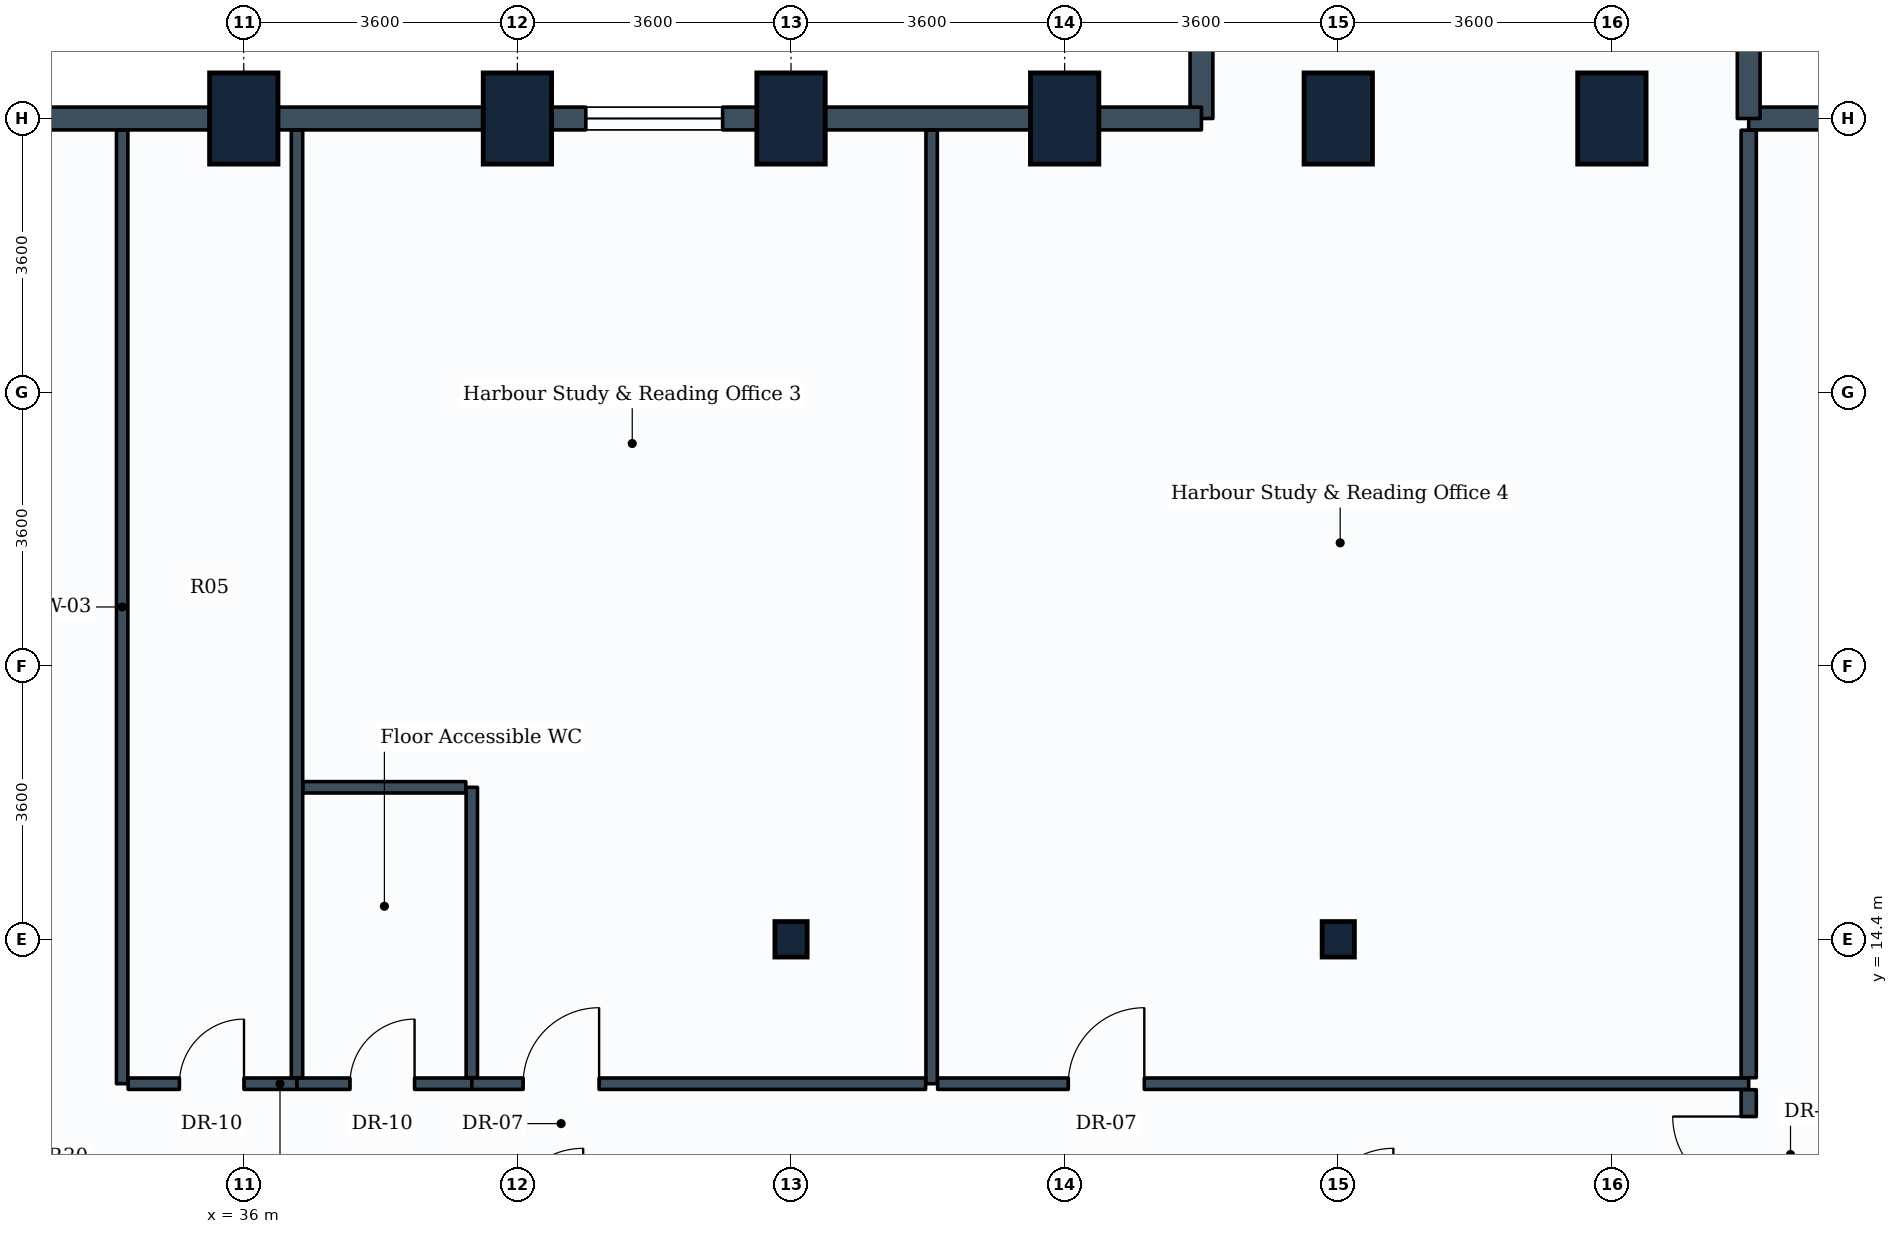
"""IFC4 building model, lengths in metres.
Left out: names, types, materials, properties, quantities, classifications, styles, units other than length and angle.
Written with IfcOpenShell. Run it as: python <this file> out.ifc"""

import sys

from ifc_helpers import new_model, si_unit, direction, frame, frame_2d, origin, origin_2d, place, context, subcontext, project, spatial, rectangle, i_section, extrude, element, fill, save


model = new_model("IFC4")
c1 = context("Model", 3, precision=1e-05, world=origin(), true_north=direction((0.0, 1.0)))
c2 = subcontext(c1, "Body", "Model", "MODEL_VIEW")
j1 = project(units=[si_unit("LENGTHUNIT", "METRE"), si_unit("PLANEANGLEUNIT", "RADIAN")], contexts=[c1])
p1 = place(None, origin())
s1 = spatial("IfcSite", under=j1, at=p1, CompositionType="ELEMENT")
p2 = place(p1, origin())
s2 = spatial("IfcBuilding", under=s1, at=p2, CompositionType="ELEMENT")
p3 = place(p2, frame((0.0, 0.0, 70.8)))
s3 = spatial("IfcBuildingStorey", under=s2, at=p3, CompositionType="ELEMENT", Elevation=70.8)
for number, where, z_axis, x_axis in (
    (1, (36.0, 25.2, 0.0), (0.0, 0.0, 1.0), (1.0, 0.0, 0.0)),
    (2, (39.6, 25.2, 0.0), (0.0, 0.0, 1.0), (1.0, 0.0, 0.0)),
):
    element("IfcColumn", number, at=place(p3, frame(where, z_axis=z_axis, x_axis=x_axis)), inside=s3, PredefinedType="COLUMN", context=c2, shape_type="SweptSolid", body=[
        extrude(rectangle(XDim=0.9, YDim=1.2, at=origin_2d()), origin(), (0.0, 0.0, 1.0), 3.9),
    ])
p4 = place(p3, frame((43.2, 14.4, 0.0), z_axis=(0.0, 0.0, 1.0), x_axis=(1.0, 0.0, 0.0)))
e3 = element("IfcColumn", 3, at=p4, inside=s3, PredefinedType="COLUMN", context=c2, shape_type="SweptSolid", body=[
    extrude(i_section(OverallWidth=0.424, OverallDepth=0.467, WebThickness=0.033, FlangeThickness=0.053, FilletRadius=0.015, at=origin_2d()), origin(), (0.0, 0.0, 1.0), 3.9),
])
for number, where, z_axis, x_axis in (
    (4, (43.2, 25.2, 0.0), (0.0, 0.0, 1.0), (1.0, 0.0, 0.0)),
    (5, (46.8, 25.2, 0.0), (0.0, 0.0, 1.0), (1.0, 0.0, 0.0)),
):
    element("IfcColumn", number, at=place(p3, frame(where, z_axis=z_axis, x_axis=x_axis)), inside=s3, PredefinedType="COLUMN", context=c2, shape_type="SweptSolid", body=[
        extrude(rectangle(XDim=0.9, YDim=1.2, at=origin_2d()), origin(), (0.0, 0.0, 1.0), 3.9),
    ])
p5 = place(p3, frame((50.4, 14.4, 0.0), z_axis=(0.0, 0.0, 1.0), x_axis=(1.0, 0.0, 0.0)))
e6 = element("IfcColumn", 6, at=p5, inside=s3, PredefinedType="COLUMN", context=c2, shape_type="SweptSolid", body=[
    extrude(i_section(OverallWidth=0.424, OverallDepth=0.467, WebThickness=0.033, FlangeThickness=0.053, FilletRadius=0.015, at=origin_2d()), origin(), (0.0, 0.0, 1.0), 3.9),
])
for number, where, z_axis, x_axis in (
    (7, (50.4, 25.2, 0.0), (0.0, 0.0, 1.0), (1.0, 0.0, 0.0)),
    (8, (54.0, 25.2, 0.0), (0.0, 0.0, 1.0), (1.0, 0.0, 0.0)),
):
    element("IfcColumn", number, at=place(p3, frame(where, z_axis=z_axis, x_axis=x_axis)), inside=s3, PredefinedType="COLUMN", context=c2, shape_type="SweptSolid", body=[
        extrude(rectangle(XDim=0.9, YDim=1.2, at=origin_2d()), origin(), (0.0, 0.0, 1.0), 3.9),
    ])
p6 = place(p3, frame((55.8, 25.2, 0.0), z_axis=(0.0, 0.0, 1.0), x_axis=(1.0, 0.0, 0.0)))
e9 = element("IfcWall", 9, at=p6, inside=s3, PredefinedType="STANDARD", context=c2, shape_type="SweptSolid", body=[
    extrude(rectangle(XDim=1.8, YDim=0.3, at=frame_2d((0.9, 0.0))), origin(), (0.0, 0.0, 1.0), 2.93),
])
for number, where, z_axis, x_axis in (
    (10, (55.8, 27.3, 0.0), (0.0, 0.0, 1.0), (0.0, -1.0, 0.0)),
    (11, (48.6, 27.3, 0.0), (0.0, 0.0, 1.0), (0.0, -1.0, 0.0)),
):
    element("IfcWall", number, at=place(p3, frame(where, z_axis=z_axis, x_axis=x_axis)), inside=s3, PredefinedType="STANDARD", context=c2, shape_type="SweptSolid", body=[
        extrude(rectangle(XDim=2.1, YDim=0.3, at=frame_2d((1.05, 0.0))), origin(), (0.0, 0.0, 1.0), 2.93),
    ])
p7 = place(p3, frame((46.8, 25.2, 0.0), z_axis=(0.0, 0.0, 1.0), x_axis=(1.0, 0.0, 0.0)))
e12 = element("IfcWall", 12, at=p7, inside=s3, PredefinedType="STANDARD", context=c2, shape_type="SweptSolid", body=[
    extrude(rectangle(XDim=1.8, YDim=0.3, at=frame_2d((0.9, 0.0))), origin(), (0.0, 0.0, 1.0), 2.93),
])
p8 = place(p3, frame((43.2, 25.2, 0.0), z_axis=(0.0, 0.0, 1.0), x_axis=(1.0, 0.0, 0.0)))
e13 = element("IfcWall", 13, at=p8, inside=s3, PredefinedType="STANDARD", context=c2, shape_type="SweptSolid", body=[
    extrude(rectangle(XDim=3.6, YDim=0.3, at=frame_2d((1.8, 0.0))), origin(), (0.0, 0.0, 1.0), 2.93),
])
p9 = place(p3, frame((39.6, 25.2, 0.0), z_axis=(0.0, 0.0, 1.0), x_axis=(1.0, 0.0, 0.0)))
e14 = element("IfcWall", 14, at=p9, inside=s3, PredefinedType="STANDARD", context=c2, shape_type="SweptSolid", body=[
    extrude(rectangle(XDim=3.6, YDim=0.3, at=frame_2d((1.8, 0.0))), origin(), (0.0, 0.0, 1.0), 2.93),
])
p10 = place(p9, frame((0.9, 0.0, 0.85)))
e15 = element("IfcOpeningElement", 15, at=p10, cuts=e14, PredefinedType="OPENING", context=c2, shape_type="SweptSolid", body=[
    extrude(rectangle(XDim=1.8, YDim=1.35, at=frame_2d((0.9, 0.675))), frame((0.0, 0.16, 0.0), z_axis=(0.0, -1.0, 0.0), x_axis=(1.0, 0.0, 0.0)), (0.0, 0.0, 1.0), 0.32),
])
for number, where, z_axis, x_axis in (
    (16, (36.0, 25.2, 0.0), (0.0, 0.0, 1.0), (1.0, 0.0, 0.0)),
    (17, (32.4, 25.2, 0.0), (0.0, 0.0, 1.0), (1.0, 0.0, 0.0)),
):
    element("IfcWall", number, at=place(p3, frame(where, z_axis=z_axis, x_axis=x_axis)), inside=s3, PredefinedType="STANDARD", context=c2, shape_type="SweptSolid", body=[
        extrude(rectangle(XDim=3.6, YDim=0.3, at=frame_2d((1.8, 0.0))), origin(), (0.0, 0.0, 1.0), 2.93),
    ])
p11 = place(p3, frame((34.4, 12.5, 0.0), z_axis=(0.0, 0.0, 1.0), x_axis=(0.0, 1.0, 0.0)))
e18 = element("IfcWall", 18, at=p11, inside=s3, PredefinedType="PARTITIONING", context=c2, shape_type="SweptSolid", body=[
    extrude(rectangle(XDim=12.546, YDim=0.15, at=frame_2d((6.273, 0.0))), origin(), (0.0, 0.0, 1.0), 2.93),
])
p12 = place(p3, frame((34.479, 12.5, 0.0), z_axis=(0.0, 0.0, 1.0), x_axis=(1.0, 0.0, 0.0)))
e19 = element("IfcWall", 19, at=p12, inside=s3, PredefinedType="PARTITIONING", context=c2, shape_type="SweptSolid", body=[
    extrude(rectangle(XDim=2.221, YDim=0.15, at=frame_2d((1.11, 0.0))), origin(), (0.0, 0.0, 1.0), 3.01),
])
p13 = place(p12, frame((0.674, 0.0, 0.0)))
e20 = element("IfcOpeningElement", 20, at=p13, cuts=e19, PredefinedType="OPENING", context=c2, shape_type="SweptSolid", body=[
    extrude(rectangle(XDim=0.85, YDim=2.1, at=frame_2d((0.425, 1.05))), frame((0.0, 0.085, 0.0), z_axis=(0.0, -1.0, 0.0), x_axis=(1.0, 0.0, 0.0)), (0.0, 0.0, 1.0), 0.17),
])
p14 = place(p3, frame((36.7, 12.579, 0.0), z_axis=(0.0, 0.0, 1.0), x_axis=(0.0, 1.0, 0.0)))
e21 = element("IfcWall", 21, at=p14, inside=s3, PredefinedType="PARTITIONING", context=c2, shape_type="SweptSolid", body=[
    extrude(rectangle(XDim=12.467, YDim=0.15, at=frame_2d((6.233, 0.0))), origin(), (0.0, 0.0, 1.0), 2.93),
])
p15 = place(p3, frame((36.7, 12.5, 0.0), z_axis=(0.0, 0.0, 1.0), x_axis=(1.0, 0.0, 0.0)))
e22 = element("IfcWall", 22, at=p15, inside=s3, PredefinedType="PARTITIONING", context=c2, shape_type="SweptSolid", body=[
    extrude(rectangle(XDim=2.3, YDim=0.15, at=frame_2d((1.15, 0.0))), origin(), (0.0, 0.0, 1.0), 3.565),
])
p16 = place(p15, frame((0.697, 0.0, 0.0)))
e23 = element("IfcOpeningElement", 23, at=p16, cuts=e22, PredefinedType="OPENING", context=c2, shape_type="SweptSolid", body=[
    extrude(rectangle(XDim=0.85, YDim=2.1, at=frame_2d((0.425, 1.05))), frame((0.0, 0.085, 0.0), z_axis=(0.0, -1.0, 0.0), x_axis=(1.0, 0.0, 0.0)), (0.0, 0.0, 1.0), 0.17),
])
p17 = place(p3, frame((39.0, 12.579, 0.0), z_axis=(0.0, 0.0, 1.0), x_axis=(0.0, 1.0, 0.0)))
e24 = element("IfcWall", 24, at=p17, inside=s3, PredefinedType="PARTITIONING", context=c2, shape_type="SweptSolid", body=[
    extrude(rectangle(XDim=3.821, YDim=0.15, at=frame_2d((1.91, 0.0))), origin(), (0.0, 0.0, 1.0), 3.01),
])
p18 = place(p3, frame((36.779, 16.4, 0.0), z_axis=(0.0, 0.0, 1.0), x_axis=(1.0, 0.0, 0.0)))
e25 = element("IfcWall", 25, at=p18, inside=s3, PredefinedType="PARTITIONING", context=c2, shape_type="SweptSolid", body=[
    extrude(rectangle(XDim=2.142, YDim=0.15, at=frame_2d((1.071, 0.0))), origin(), (0.0, 0.0, 1.0), 3.565),
])
p19 = place(p3, frame((45.05, 12.5, 0.0), z_axis=(0.0, 0.0, 1.0), x_axis=(0.0, 1.0, 0.0)))
e26 = element("IfcWall", 26, at=p19, inside=s3, PredefinedType="PARTITIONING", context=c2, shape_type="SweptSolid", body=[
    extrude(rectangle(XDim=12.546, YDim=0.15, at=frame_2d((6.273, 0.0))), origin(), (0.0, 0.0, 1.0), 2.93),
])
p20 = place(p3, frame((39.0, 12.5, 0.0), z_axis=(0.0, 0.0, 1.0), x_axis=(1.0, 0.0, 0.0)))
e27 = element("IfcWall", 27, at=p20, inside=s3, PredefinedType="PARTITIONING", context=c2, shape_type="SweptSolid", body=[
    extrude(rectangle(XDim=5.971, YDim=0.15, at=frame_2d((2.985, 0.0))), origin(), (0.0, 0.0, 1.0), 2.97),
])
p21 = place(p20, frame((0.675, 0.0, 0.0)))
e28 = element("IfcOpeningElement", 28, at=p21, cuts=e27, PredefinedType="OPENING", context=c2, shape_type="SweptSolid", body=[
    extrude(rectangle(XDim=1.0, YDim=2.1, at=frame_2d((0.5, 1.05))), frame((0.0, 0.085, 0.0), z_axis=(0.0, -1.0, 0.0), x_axis=(1.0, 0.0, 0.0)), (0.0, 0.0, 1.0), 0.17),
])
p22 = place(p3, frame((45.129, 12.5, 0.0), z_axis=(0.0, 0.0, 1.0), x_axis=(1.0, 0.0, 0.0)))
e29 = element("IfcWall", 29, at=p22, inside=s3, PredefinedType="PARTITIONING", context=c2, shape_type="SweptSolid", body=[
    extrude(rectangle(XDim=10.671, YDim=0.15, at=frame_2d((5.335, 0.0))), origin(), (0.0, 0.0, 1.0), 2.97),
])
p23 = place(p22, frame((1.719, 0.0, 0.0)))
e30 = element("IfcOpeningElement", 30, at=p23, cuts=e29, PredefinedType="OPENING", context=c2, shape_type="SweptSolid", body=[
    extrude(rectangle(XDim=1.0, YDim=2.1, at=frame_2d((0.5, 1.05))), frame((0.0, 0.085, 0.0), z_axis=(0.0, -1.0, 0.0), x_axis=(1.0, 0.0, 0.0)), (0.0, 0.0, 1.0), 0.17),
])
p24 = place(p3, frame((55.8, 12.579, 0.0), z_axis=(0.0, 0.0, 1.0), x_axis=(0.0, 1.0, 0.0)))
e31 = element("IfcWall", 31, at=p24, inside=s3, PredefinedType="PARTITIONING", context=c2, shape_type="SweptSolid", body=[
    extrude(rectangle(XDim=12.467, YDim=0.2, at=frame_2d((6.233, 0.0))), origin(), (0.0, 0.0, 1.0), 2.93),
])
p25 = place(p3, frame((55.8, 10.729, 0.0), z_axis=(0.0, 0.0, 1.0), x_axis=(0.0, 1.0, 0.0)))
e32 = element("IfcWall", 32, at=p25, inside=s3, PredefinedType="PARTITIONING", context=c2, shape_type="SweptSolid", body=[
    extrude(rectangle(XDim=1.692, YDim=0.2, at=frame_2d((0.846, 0.0))), origin(), (0.0, 0.0, 1.0), 3.565),
])
p26 = place(p25, frame((0.339, 0.0, 0.0)))
e33 = element("IfcOpeningElement", 33, at=p26, cuts=e32, PredefinedType="OPENING", context=c2, shape_type="SweptSolid", body=[
    extrude(rectangle(XDim=1.0, YDim=2.1, at=frame_2d((0.5, 1.05))), frame((0.0, 0.11, 0.0), z_axis=(0.0, -1.0, 0.0), x_axis=(1.0, 0.0, 0.0)), (0.0, 0.0, 1.0), 0.22),
])
p27 = place(p10, origin())
e34 = element("IfcWindow", 34, at=p27, inside=s3, PartitioningType="SINGLE_PANEL", PredefinedType="WINDOW", context=c2, shape_type="SweptSolid", body=[
    extrude(rectangle(XDim=1.8, YDim=1.35, at=frame_2d((0.9, 0.675))), frame((0.0, 0.03, 0.0), z_axis=(0.0, -1.0, 0.0), x_axis=(1.0, 0.0, 0.0)), (0.0, 0.0, 1.0), 0.06),
])
fill(e15, e34)
p28 = place(p13, origin())
e35 = element("IfcDoor", 35, at=p28, inside=s3, OperationType="SINGLE_SWING_RIGHT", PredefinedType="DOOR", context=c2, shape_type="SweptSolid", body=[
    extrude(rectangle(XDim=0.85, YDim=2.1, at=frame_2d((0.425, 1.05))), frame((0.0, 0.025, 0.0), z_axis=(0.0, -1.0, 0.0), x_axis=(1.0, 0.0, 0.0)), (0.0, 0.0, 1.0), 0.05),
])
fill(e20, e35)
p29 = place(p16, origin())
e36 = element("IfcDoor", 36, at=p29, inside=s3, OperationType="SINGLE_SWING_RIGHT", PredefinedType="DOOR", context=c2, shape_type="SweptSolid", body=[
    extrude(rectangle(XDim=0.85, YDim=2.1, at=frame_2d((0.425, 1.05))), frame((0.0, 0.025, 0.0), z_axis=(0.0, -1.0, 0.0), x_axis=(1.0, 0.0, 0.0)), (0.0, 0.0, 1.0), 0.05),
])
fill(e23, e36)
p30 = place(p21, origin())
e37 = element("IfcDoor", 37, at=p30, inside=s3, OperationType="SINGLE_SWING_RIGHT", PredefinedType="DOOR", context=c2, shape_type="SweptSolid", body=[
    extrude(rectangle(XDim=1.0, YDim=2.1, at=frame_2d((0.5, 1.05))), frame((0.0, 0.025, 0.0), z_axis=(0.0, -1.0, 0.0), x_axis=(1.0, 0.0, 0.0)), (0.0, 0.0, 1.0), 0.05),
])
fill(e28, e37)
p31 = place(p23, origin())
e38 = element("IfcDoor", 38, at=p31, inside=s3, OperationType="SINGLE_SWING_RIGHT", PredefinedType="DOOR", context=c2, shape_type="SweptSolid", body=[
    extrude(rectangle(XDim=1.0, YDim=2.1, at=frame_2d((0.5, 1.05))), frame((0.0, 0.025, 0.0), z_axis=(0.0, -1.0, 0.0), x_axis=(1.0, 0.0, 0.0)), (0.0, 0.0, 1.0), 0.05),
])
fill(e30, e38)
p32 = place(p26, origin())
e39 = element("IfcDoor", 39, at=p32, inside=s3, OperationType="SINGLE_SWING_RIGHT", PredefinedType="DOOR", context=c2, shape_type="SweptSolid", body=[
    extrude(rectangle(XDim=1.0, YDim=2.1, at=frame_2d((0.5, 1.05))), frame((0.0, 0.025, 0.0), z_axis=(0.0, -1.0, 0.0), x_axis=(1.0, 0.0, 0.0)), (0.0, 0.0, 1.0), 0.05),
])
fill(e33, e39)
save(model, sys.argv[1])
